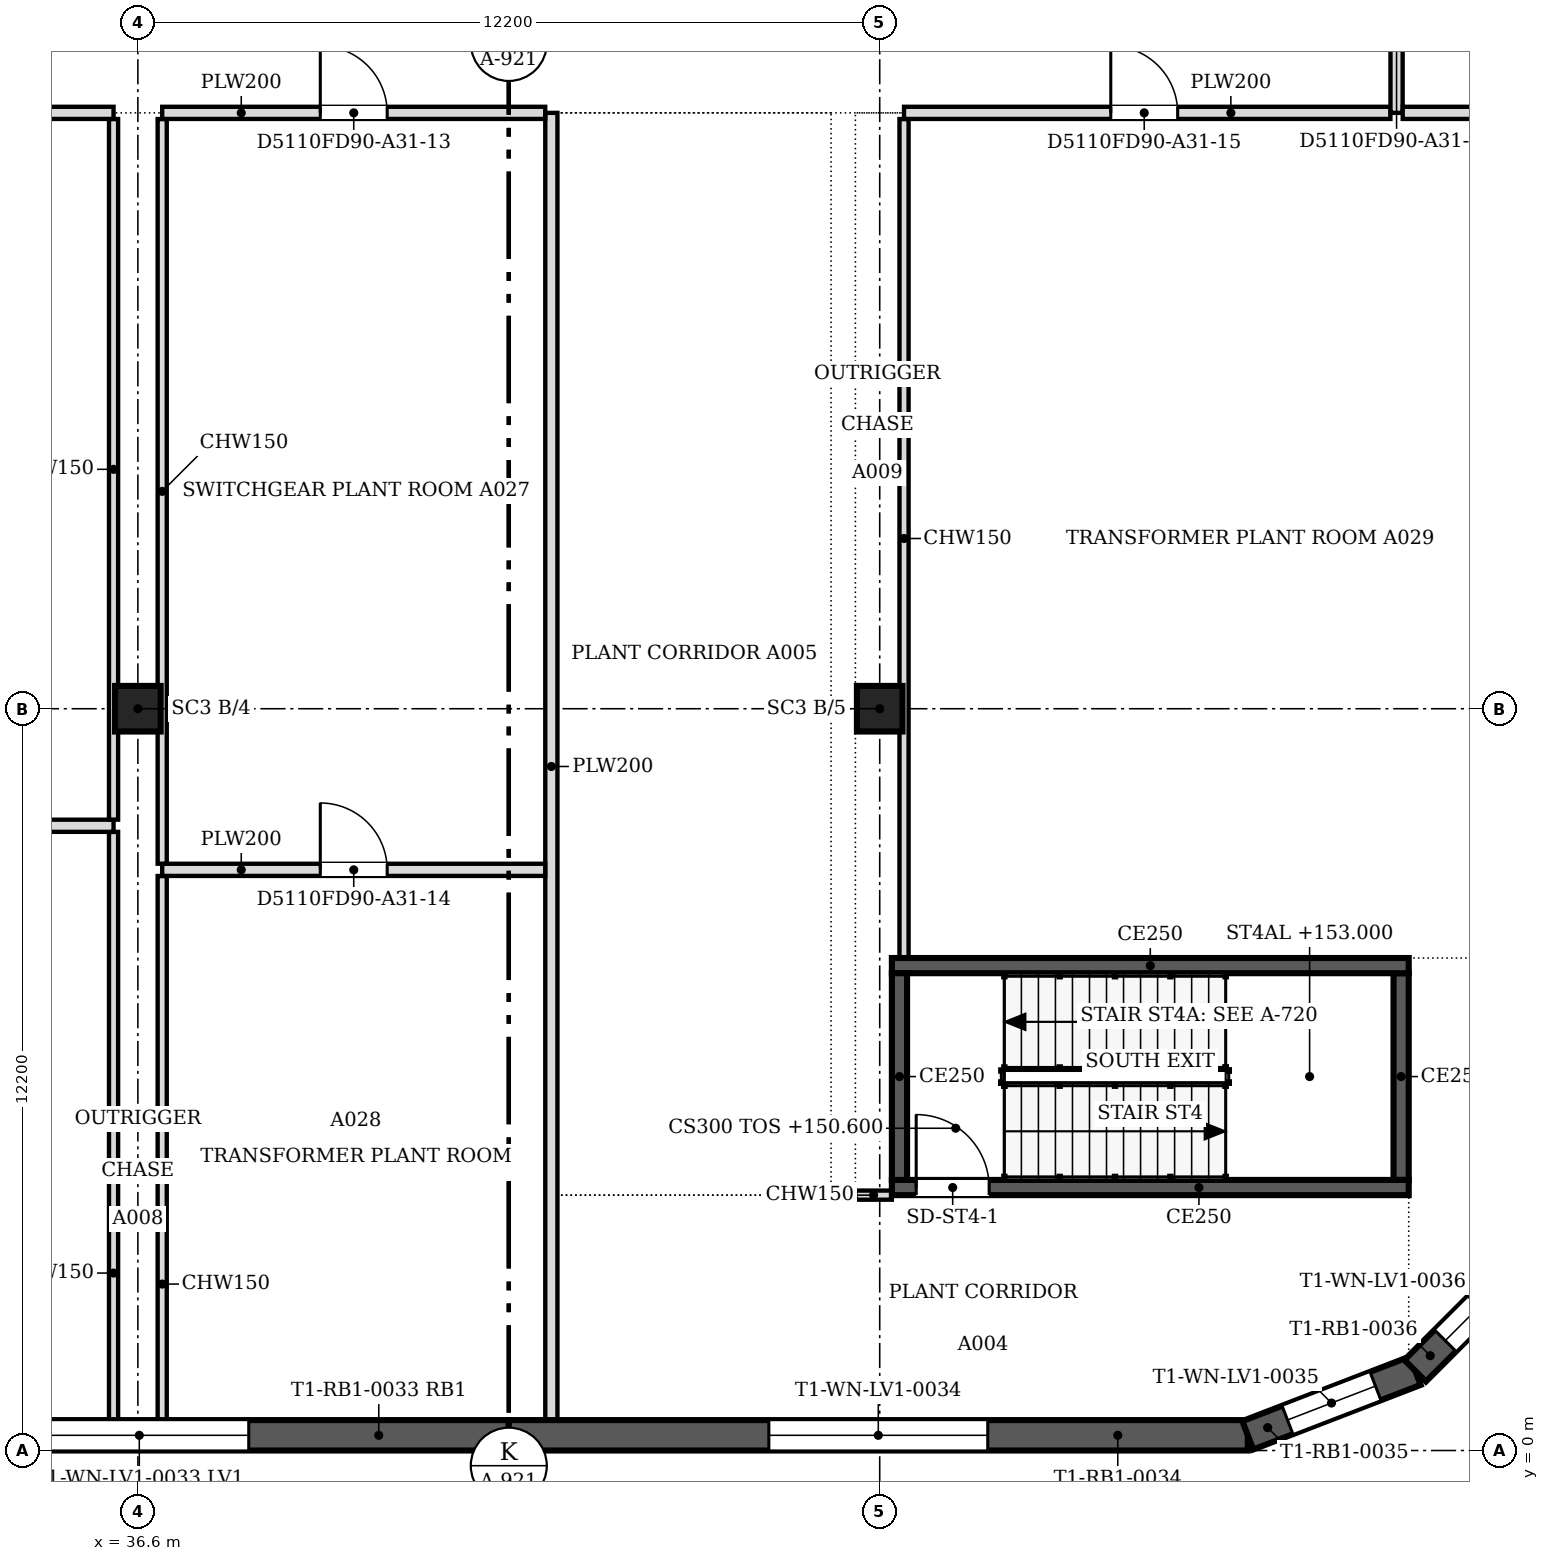
"""IFC4 building model, lengths in metres.
Left out: names, types, materials, properties, quantities, classifications, styles, units other than length and angle.
Written with IfcOpenShell. Run it as: python <this file> out.ifc"""

import sys

from ifc_helpers import new_model, si_unit, direction, frame, frame_2d, origin, origin_2d, place, context, subcontext, project, spatial, polyline, rectangle, outline, extrude, faceted_brep, source, transform, mapped, element, fill, save


model = new_model("IFC4")
c1 = context("Model", 3, precision=1e-05, world=origin(), true_north=direction((0.0, 1.0)))
c2 = subcontext(c1, "Body", "Model", "MODEL_VIEW")
j1 = project(units=[si_unit("LENGTHUNIT", "METRE"), si_unit("PLANEANGLEUNIT", "RADIAN")], contexts=[c1])
p1 = place(None, origin())
s1 = spatial("IfcSite", under=j1, at=p1, CompositionType="ELEMENT")
p2 = place(p1, origin())
s2 = spatial("IfcBuilding", under=s1, at=p2, CompositionType="ELEMENT")
p3 = place(p2, frame((0.0, 0.0, 150.6)))
s3 = spatial("IfcBuildingStorey", under=s2, at=p3, CompositionType="ELEMENT", Elevation=150.6)
for number, where, z_axis, x_axis in (
    (1, (36.6, 12.2, 0.0), (0.0, 0.0, 1.0), (1.0, 0.0, 0.0)),
    (2, (48.8, 12.2, 0.0), (0.0, 0.0, 1.0), (1.0, 0.0, 0.0)),
):
    element("IfcColumn", number, at=place(p3, frame(where, z_axis=z_axis, x_axis=x_axis)), inside=s3, PredefinedType="COLUMN", context=c2, shape_type="SweptSolid", body=[
        extrude(rectangle(XDim=0.75, YDim=0.75, at=origin_2d()), origin(), (0.0, 0.0, 1.0), 4.6),
    ])
m1 = source(origin(), c2, "Body", "Brep", [
    faceted_brep([(0.0, -0.25, 0.0), (12.154, -0.25, 0.0), (12.154, -0.25, 4.8), (0.0, -0.25, 4.8), (0.047, 0.25, 4.8), (12.154, 0.25, 4.8), (12.154, 0.25, 0.0), (0.047, 0.25, 0.0), (0.0, 0.0, 0.0), (0.0, 0.0, 4.8)], [[[0, 1, 2, 3]], [[4, 5, 6, 7]], [[7, 6, 1, 0, 8]], [[5, 4, 9, 3, 2]], [[8, 0, 3, 9]], [[7, 8, 9, 4]], [[1, 6, 5, 2]]]),
])
p4 = place(p3, frame((30.547, 0.25, 0.0), z_axis=(0.0, 0.0, 1.0), x_axis=(1.0, 0.0, 0.0)))
e3 = element("IfcWall", 3, at=p4, inside=s3, PredefinedType="SOLIDWALL", context=c2, shape_type="MappedRepresentation", body=[
    mapped(m1, transform((0.0, 0.0, 0.0), scale=1.0)),
])
m2 = source(origin(), c2, "Body", "SweptSolid", [
    extrude(outline(polyline([(4.277, 0.8), (7.877, 0.8), (7.877, 4.0), (4.277, 4.0), (4.277, 0.8)])), frame((0.0, 0.26, 0.0), z_axis=(0.0, -1.0, 0.0), x_axis=(1.0, 0.0, 0.0)), (0.0, 0.0, 1.0), 0.52),
])
p5 = place(p4, origin())
e4 = element("IfcOpeningElement", 4, at=p5, cuts=e3, PredefinedType="OPENING", context=c2, shape_type="MappedRepresentation", body=[
    mapped(m2, transform((0.0, 0.0, 0.0), scale=1.0)),
])
m3 = source(origin(), c2, "Body", "Brep", [
    faceted_brep([(0.0, -0.25, 0.0), (12.154, -0.25, 0.0), (12.154, -0.25, 4.8), (0.0, -0.25, 4.8), (0.0, 0.25, 4.8), (12.107, 0.25, 4.8), (12.107, 0.25, 0.0), (0.0, 0.25, 0.0), (12.154, -0.0, 0.0), (12.154, -0.0, 4.8)], [[[0, 1, 2, 3]], [[4, 5, 6, 7]], [[7, 6, 8, 1, 0]], [[9, 2, 1, 8]], [[5, 4, 3, 2, 9]], [[4, 7, 0, 3]], [[8, 6, 5, 9]]]),
])
p6 = place(p3, frame((42.7, 0.25, 0.0), z_axis=(0.0, 0.0, 1.0), x_axis=(1.0, 0.0, 0.0)))
e5 = element("IfcWall", 5, at=p6, inside=s3, PredefinedType="SOLIDWALL", context=c2, shape_type="MappedRepresentation", body=[
    mapped(m3, transform((0.0, 0.0, 0.0), scale=1.0)),
])
p7 = place(p6, origin())
e6 = element("IfcOpeningElement", 6, at=p7, cuts=e5, PredefinedType="OPENING", context=c2, shape_type="MappedRepresentation", body=[
    mapped(m2, transform((0.0, 0.0, 0.0), scale=1.0)),
])
m4 = source(origin(), c2, "Body", "Brep", [
    faceted_brep([(0.0, -0.25, 0.0), (2.95, -0.25, 0.0), (2.95, -0.25, 4.8), (0.0, -0.25, 4.8), (0.047, 0.25, 4.8), (2.898, 0.25, 4.8), (2.898, 0.25, 0.0), (0.047, 0.25, 0.0), (2.95, 0.0, 0.0), (0.0, 0.0, 0.0), (2.95, 0.0, 4.8), (0.0, 0.0, 4.8)], [[[0, 1, 2, 3]], [[4, 5, 6, 7]], [[7, 6, 8, 1, 0, 9]], [[10, 2, 1, 8]], [[5, 4, 11, 3, 2, 10]], [[9, 0, 3, 11]], [[7, 9, 11, 4]], [[8, 6, 5, 10]]]),
])
p8 = place(p3, frame((54.854, 0.25, 0.0), z_axis=(0.0, 0.0, 1.0), x_axis=(0.932999673775, 0.359877213415, 0.0)))
e7 = element("IfcWall", 7, at=p8, inside=s3, PredefinedType="SOLIDWALL", context=c2, shape_type="MappedRepresentation", body=[
    mapped(m4, transform((0.0, 0.0, 0.0), scale=1.0)),
])
m5 = source(origin(), c2, "Body", "SweptSolid", [
    extrude(outline(polyline([(0.7, 0.8), (2.25, 0.8), (2.25, 4.0), (0.7, 4.0), (0.7, 0.8)])), frame((0.0, 0.26, 0.0), z_axis=(0.0, -1.0, 0.0), x_axis=(1.0, 0.0, 0.0)), (0.0, 0.0, 1.0), 0.52),
])
p9 = place(p8, origin())
e8 = element("IfcOpeningElement", 8, at=p9, cuts=e7, PredefinedType="OPENING", context=c2, shape_type="MappedRepresentation", body=[
    mapped(m5, transform((0.0, 0.0, 0.0), scale=1.0)),
])
m6 = source(origin(), c2, "Body", "Brep", [
    faceted_brep([(0.0, -0.25, 0.0), (2.944, -0.25, 0.0), (2.944, -0.25, 4.8), (0.0, -0.25, 4.8), (0.053, 0.25, 4.8), (2.891, 0.25, 4.8), (2.891, 0.25, 0.0), (0.053, 0.25, 0.0), (2.944, 0.0, 0.0), (0.0, 0.0, 0.0), (2.944, 0.0, 4.8), (0.0, 0.0, 4.8)], [[[0, 1, 2, 3]], [[4, 5, 6, 7]], [[7, 6, 8, 1, 0, 9]], [[10, 2, 1, 8]], [[5, 4, 11, 3, 2, 10]], [[9, 0, 3, 11]], [[7, 9, 11, 4]], [[8, 6, 5, 10]]]),
])
p10 = place(p3, frame((57.606, 1.312, 0.0), z_axis=(0.0, 0.0, 1.0), x_axis=(0.707106781187, 0.707106781187, 0.0)))
e9 = element("IfcWall", 9, at=p10, inside=s3, PredefinedType="SOLIDWALL", context=c2, shape_type="MappedRepresentation", body=[
    mapped(m6, transform((0.0, 0.0, 0.0), scale=1.0)),
])
m7 = source(origin(), c2, "Body", "SweptSolid", [
    extrude(outline(polyline([(0.7, 0.8), (2.244, 0.8), (2.244, 4.0), (0.7, 4.0), (0.7, 0.8)])), frame((0.0, 0.26, 0.0), z_axis=(0.0, -1.0, 0.0), x_axis=(1.0, 0.0, 0.0)), (0.0, 0.0, 1.0), 0.52),
])
p11 = place(p10, origin())
e10 = element("IfcOpeningElement", 10, at=p11, cuts=e9, PredefinedType="OPENING", context=c2, shape_type="MappedRepresentation", body=[
    mapped(m7, transform((0.0, 0.0, 0.0), scale=1.0)),
])
p12 = place(p3, frame((57.5, 4.325, 0.0), z_axis=(0.0, 0.0, 1.0), x_axis=(-1.0, 0.0, 0.0)))
e11 = element("IfcWall", 11, at=p12, inside=s3, PredefinedType="SOLIDWALL", context=c2, shape_type="SweptSolid", body=[
    extrude(rectangle(XDim=8.5, YDim=0.25, at=frame_2d((4.25, 0.0))), origin(), (0.0, 0.0, 1.0), 4.8),
])
m8 = source(origin(), c2, "Body", "SweptSolid", [
    extrude(rectangle(XDim=1.2, YDim=2.1, at=frame_2d((0.6, 1.05))), frame((0.0, 0.135, 0.0), z_axis=(0.0, -1.0, 0.0), x_axis=(1.0, 0.0, 0.0)), (0.0, 0.0, 1.0), 0.27),
])
p13 = place(p12, frame((6.9, 0.0, 0.0)))
e12 = element("IfcOpeningElement", 12, at=p13, cuts=e11, PredefinedType="OPENING", context=c2, shape_type="MappedRepresentation", body=[
    mapped(m8, transform((0.0, 0.0, 0.0), scale=1.0)),
])
p14 = place(p3, frame((49.125, 4.45, 0.0), z_axis=(0.0, 0.0, 1.0), x_axis=(0.0, 1.0, 0.0)))
e13 = element("IfcWall", 13, at=p14, inside=s3, PredefinedType="SOLIDWALL", context=c2, shape_type="SweptSolid", body=[
    extrude(rectangle(XDim=3.4, YDim=0.25, at=frame_2d((1.7, 0.0))), origin(), (0.0, 0.0, 1.0), 4.8),
])
p15 = place(p3, frame((49.0, 7.975, 0.0), z_axis=(0.0, 0.0, 1.0), x_axis=(1.0, 0.0, 0.0)))
e14 = element("IfcWall", 14, at=p15, inside=s3, PredefinedType="SOLIDWALL", context=c2, shape_type="SweptSolid", body=[
    extrude(rectangle(XDim=8.5, YDim=0.25, at=frame_2d((4.25, 0.0))), origin(), (0.0, 0.0, 1.0), 4.8),
])
p16 = place(p3, frame((57.375, 7.85, 0.0), z_axis=(0.0, 0.0, 1.0), x_axis=(0.0, -1.0, 0.0)))
e15 = element("IfcWall", 15, at=p16, inside=s3, PredefinedType="SOLIDWALL", context=c2, shape_type="SweptSolid", body=[
    extrude(rectangle(XDim=3.4, YDim=0.25, at=frame_2d((1.7, 0.0))), origin(), (0.0, 0.0, 1.0), 4.8),
])
p17 = place(p3, frame((36.2, 0.5, 0.0), z_axis=(0.0, 0.0, 1.0), x_axis=(0.0, 1.0, 0.0)))
e16 = element("IfcWall", 16, at=p17, inside=s3, PredefinedType="PARTITIONING", context=c2, shape_type="SweptSolid", body=[
    extrude(rectangle(XDim=9.674, YDim=0.15, at=frame_2d((4.837, 0.0))), origin(), (0.0, 0.0, 1.0), 4.067),
])
p18 = place(p3, frame((37.0, 0.5, 0.0), z_axis=(0.0, 0.0, 1.0), x_axis=(0.0, 1.0, 0.0)))
e17 = element("IfcWall", 17, at=p18, inside=s3, PredefinedType="PARTITIONING", context=c2, shape_type="SweptSolid", body=[
    extrude(rectangle(XDim=8.949, YDim=0.15, at=frame_2d((4.475, 0.0))), origin(), (0.0, 0.0, 1.0), 4.067),
])
p19 = place(p3, frame((43.4, 0.5, 0.0), z_axis=(0.0, 0.0, 1.0), x_axis=(0.0, 1.0, 0.0)))
e18 = element("IfcWall", 18, at=p19, inside=s3, PredefinedType="PARTITIONING", context=c2, shape_type="SweptSolid", body=[
    extrude(rectangle(XDim=21.5, YDim=0.2, at=frame_2d((10.75, 0.0))), origin(), (0.0, 0.0, 1.0), 4.067),
])
p20 = place(p3, frame((48.4, 4.2, 0.0), z_axis=(0.0, 0.0, 1.0), x_axis=(1.0, 0.0, 0.0)))
e19 = element("IfcWall", 19, at=p20, inside=s3, PredefinedType="PARTITIONING", context=c2, shape_type="SweptSolid", body=[
    extrude(rectangle(XDim=0.6, YDim=0.15, at=frame_2d((0.3, 0.0))), origin(), (0.0, 0.0, 1.0), 4.067),
])
p21 = place(p3, frame((49.2, 8.1, 0.0), z_axis=(0.0, 0.0, 1.0), x_axis=(0.0, 1.0, 0.0)))
e20 = element("IfcWall", 20, at=p21, inside=s3, PredefinedType="PARTITIONING", context=c2, shape_type="SweptSolid", body=[
    extrude(rectangle(XDim=13.799, YDim=0.15, at=frame_2d((6.899, 0.0))), origin(), (0.0, 0.0, 1.0), 4.067),
])
p22 = place(p3, frame((43.299, 9.55, 0.0), z_axis=(0.0, 0.0, 1.0), x_axis=(-1.0, 0.0, 0.0)))
e21 = element("IfcWall", 21, at=p22, inside=s3, PredefinedType="PARTITIONING", context=c2, shape_type="SweptSolid", body=[
    extrude(rectangle(XDim=6.299, YDim=0.2, at=frame_2d((3.149, 0.0))), origin(), (0.0, 0.0, 1.0), 4.067),
])
m9 = source(origin(), c2, "Body", "SweptSolid", [
    extrude(rectangle(XDim=1.1, YDim=2.1, at=frame_2d((0.55, 1.05))), frame((0.0, 0.11, 0.0), z_axis=(0.0, -1.0, 0.0), x_axis=(1.0, 0.0, 0.0)), (0.0, 0.0, 1.0), 0.22),
])
p23 = place(p22, frame((2.599, 0.0, 0.0)))
e22 = element("IfcOpeningElement", 22, at=p23, cuts=e21, PredefinedType="OPENING", context=c2, shape_type="MappedRepresentation", body=[
    mapped(m9, transform((0.0, 0.0, 0.0), scale=1.0)),
])
p24 = place(p3, frame((37.0, 9.651, 0.0), z_axis=(0.0, 0.0, 1.0), x_axis=(0.0, 1.0, 0.0)))
e23 = element("IfcWall", 23, at=p24, inside=s3, PredefinedType="PARTITIONING", context=c2, shape_type="SweptSolid", body=[
    extrude(rectangle(XDim=12.248, YDim=0.15, at=frame_2d((6.124, 0.0))), origin(), (0.0, 0.0, 1.0), 4.067),
])
p25 = place(p3, frame((36.2, 10.275, 0.0), z_axis=(0.0, 0.0, 1.0), x_axis=(-1.0, 0.0, 0.0)))
e24 = element("IfcWall", 24, at=p25, inside=s3, PredefinedType="PARTITIONING", context=c2, shape_type="SweptSolid", body=[
    extrude(rectangle(XDim=11.3, YDim=0.2, at=frame_2d((5.65, 0.0))), origin(), (0.0, 0.0, 1.0), 4.067),
])
p26 = place(p25, frame((5.1, 0.0, 0.0)))
e25 = element("IfcOpeningElement", 25, at=p26, cuts=e24, PredefinedType="OPENING", context=c2, shape_type="MappedRepresentation", body=[
    mapped(m9, transform((0.0, 0.0, 0.0), scale=1.0)),
])
p27 = place(p3, frame((36.2, 10.376, 0.0), z_axis=(0.0, 0.0, 1.0), x_axis=(0.0, 1.0, 0.0)))
e26 = element("IfcWall", 26, at=p27, inside=s3, PredefinedType="PARTITIONING", context=c2, shape_type="SweptSolid", body=[
    extrude(rectangle(XDim=11.523, YDim=0.15, at=frame_2d((5.761, 0.0))), origin(), (0.0, 0.0, 1.0), 4.067),
])
p28 = place(p3, frame((36.2, 22.0, 0.0), z_axis=(0.0, 0.0, 1.0), x_axis=(-1.0, 0.0, 0.0)))
e27 = element("IfcWall", 27, at=p28, inside=s3, PredefinedType="PARTITIONING", context=c2, shape_type="SweptSolid", body=[
    extrude(rectangle(XDim=5.7, YDim=0.2, at=frame_2d((2.85, 0.0))), origin(), (0.0, 0.0, 1.0), 4.067),
])
p29 = place(p28, frame((2.3, 0.0, 0.0)))
e28 = element("IfcOpeningElement", 28, at=p29, cuts=e27, PredefinedType="OPENING", context=c2, shape_type="MappedRepresentation", body=[
    mapped(m9, transform((0.0, 0.0, 0.0), scale=1.0)),
])
p30 = place(p3, frame((43.299, 22.0, 0.0), z_axis=(0.0, 0.0, 1.0), x_axis=(-1.0, 0.0, 0.0)))
e29 = element("IfcWall", 29, at=p30, inside=s3, PredefinedType="PARTITIONING", context=c2, shape_type="SweptSolid", body=[
    extrude(rectangle(XDim=6.299, YDim=0.2, at=frame_2d((3.149, 0.0))), origin(), (0.0, 0.0, 1.0), 4.067),
])
p31 = place(p30, frame((2.599, 0.0, 0.0)))
e30 = element("IfcOpeningElement", 30, at=p31, cuts=e29, PredefinedType="OPENING", context=c2, shape_type="MappedRepresentation", body=[
    mapped(m9, transform((0.0, 0.0, 0.0), scale=1.0)),
])
p32 = place(p3, frame((57.199, 22.0, 0.0), z_axis=(0.0, 0.0, 1.0), x_axis=(-1.0, 0.0, 0.0)))
e31 = element("IfcWall", 31, at=p32, inside=s3, PredefinedType="PARTITIONING", context=c2, shape_type="SweptSolid", body=[
    extrude(rectangle(XDim=7.999, YDim=0.2, at=frame_2d((4.0, 0.0))), origin(), (0.0, 0.0, 1.0), 4.067),
])
p33 = place(p32, frame((3.499, 0.0, 0.0)))
e32 = element("IfcOpeningElement", 32, at=p33, cuts=e31, PredefinedType="OPENING", context=c2, shape_type="MappedRepresentation", body=[
    mapped(m9, transform((0.0, 0.0, 0.0), scale=1.0)),
])
p34 = place(p3, frame((57.3, 30.6, 0.0), z_axis=(0.0, 0.0, 1.0), x_axis=(0.0, -1.0, 0.0)))
e33 = element("IfcWall", 33, at=p34, inside=s3, PredefinedType="PARTITIONING", context=c2, shape_type="SweptSolid", body=[
    extrude(rectangle(XDim=8.6, YDim=0.2, at=frame_2d((4.3, 0.0))), origin(), (0.0, 0.0, 1.0), 4.067),
])
p35 = place(p34, frame((3.8, 0.0, 0.0)))
e34 = element("IfcOpeningElement", 34, at=p35, cuts=e33, PredefinedType="OPENING", context=c2, shape_type="MappedRepresentation", body=[
    mapped(m9, transform((0.0, 0.0, 0.0), scale=1.0)),
])
p36 = place(p3, frame((57.401, 22.0, 0.0), z_axis=(0.0, 0.0, 1.0), x_axis=(1.0, 0.0, 0.0)))
e35 = element("IfcWall", 35, at=p36, inside=s3, PredefinedType="PARTITIONING", context=c2, shape_type="SweptSolid", body=[
    extrude(rectangle(XDim=3.099, YDim=0.2, at=frame_2d((1.55, 0.0))), origin(), (0.0, 0.0, 1.0), 4.067),
])
m10 = source(origin(), c2, "Body", "SweptSolid", [
    extrude(outline(polyline([(4.277, 0.8), (7.877, 0.8), (7.877, 4.0), (4.277, 4.0), (4.277, 0.8)])), frame((0.0, 0.03, 0.0), z_axis=(0.0, -1.0, 0.0), x_axis=(1.0, 0.0, 0.0)), (0.0, 0.0, 1.0), 0.06),
])
p37 = place(p5, origin())
e36 = element("IfcWindow", 36, at=p37, inside=s3, PartitioningType="USERDEFINED", PredefinedType="WINDOW", context=c2, shape_type="MappedRepresentation", body=[
    mapped(m10, transform((0.0, 0.0, 0.0), scale=1.0)),
])
fill(e4, e36)
p38 = place(p7, origin())
e37 = element("IfcWindow", 37, at=p38, inside=s3, PartitioningType="USERDEFINED", PredefinedType="WINDOW", context=c2, shape_type="MappedRepresentation", body=[
    mapped(m10, transform((0.0, 0.0, 0.0), scale=1.0)),
])
fill(e6, e37)
m11 = source(origin(), c2, "Body", "SweptSolid", [
    extrude(outline(polyline([(0.7, 0.8), (2.25, 0.8), (2.25, 4.0), (0.7, 4.0), (0.7, 0.8)])), frame((0.0, 0.03, 0.0), z_axis=(0.0, -1.0, 0.0), x_axis=(1.0, 0.0, 0.0)), (0.0, 0.0, 1.0), 0.06),
])
p39 = place(p9, origin())
e38 = element("IfcWindow", 38, at=p39, inside=s3, PartitioningType="USERDEFINED", PredefinedType="WINDOW", context=c2, shape_type="MappedRepresentation", body=[
    mapped(m11, transform((0.0, 0.0, 0.0), scale=1.0)),
])
fill(e8, e38)
m12 = source(origin(), c2, "Body", "SweptSolid", [
    extrude(outline(polyline([(0.7, 0.8), (2.244, 0.8), (2.244, 4.0), (0.7, 4.0), (0.7, 0.8)])), frame((0.0, 0.03, 0.0), z_axis=(0.0, -1.0, 0.0), x_axis=(1.0, 0.0, 0.0)), (0.0, 0.0, 1.0), 0.06),
])
p40 = place(p11, origin())
e39 = element("IfcWindow", 39, at=p40, inside=s3, PartitioningType="USERDEFINED", PredefinedType="WINDOW", context=c2, shape_type="MappedRepresentation", body=[
    mapped(m12, transform((0.0, 0.0, 0.0), scale=1.0)),
])
fill(e10, e39)
m13 = source(origin(), c2, "Body", "SweptSolid", [
    extrude(rectangle(XDim=1.2, YDim=2.1, at=frame_2d((0.6, 1.05))), frame((0.0, 0.025, 0.0), z_axis=(0.0, -1.0, 0.0), x_axis=(1.0, 0.0, 0.0)), (0.0, 0.0, 1.0), 0.05),
])
p41 = place(p13, origin())
e40 = element("IfcDoor", 40, at=p41, inside=s3, OperationType="SINGLE_SWING_RIGHT", PredefinedType="DOOR", context=c2, shape_type="MappedRepresentation", body=[
    mapped(m13, transform((0.0, 0.0, 0.0), scale=1.0)),
])
fill(e12, e40)
m14 = source(origin(), c2, "Body", "SweptSolid", [
    extrude(rectangle(XDim=1.1, YDim=2.1, at=frame_2d((0.55, 1.05))), frame((0.0, 0.025, 0.0), z_axis=(0.0, -1.0, 0.0), x_axis=(1.0, 0.0, 0.0)), (0.0, 0.0, 1.0), 0.05),
])
p42 = place(p31, origin())
e41 = element("IfcDoor", 41, at=p42, inside=s3, OperationType="SINGLE_SWING_RIGHT", PredefinedType="DOOR", context=c2, shape_type="MappedRepresentation", body=[
    mapped(m14, transform((0.0, 0.0, 0.0), scale=1.0)),
])
fill(e30, e41)
p43 = place(p23, origin())
e42 = element("IfcDoor", 42, at=p43, inside=s3, OperationType="SINGLE_SWING_RIGHT", PredefinedType="DOOR", context=c2, shape_type="MappedRepresentation", body=[
    mapped(m14, transform((0.0, 0.0, 0.0), scale=1.0)),
])
fill(e22, e42)
p44 = place(p33, origin())
e43 = element("IfcDoor", 43, at=p44, inside=s3, OperationType="SINGLE_SWING_RIGHT", PredefinedType="DOOR", context=c2, shape_type="MappedRepresentation", body=[
    mapped(m14, transform((0.0, 0.0, 0.0), scale=1.0)),
])
fill(e32, e43)
save(model, sys.argv[1])
